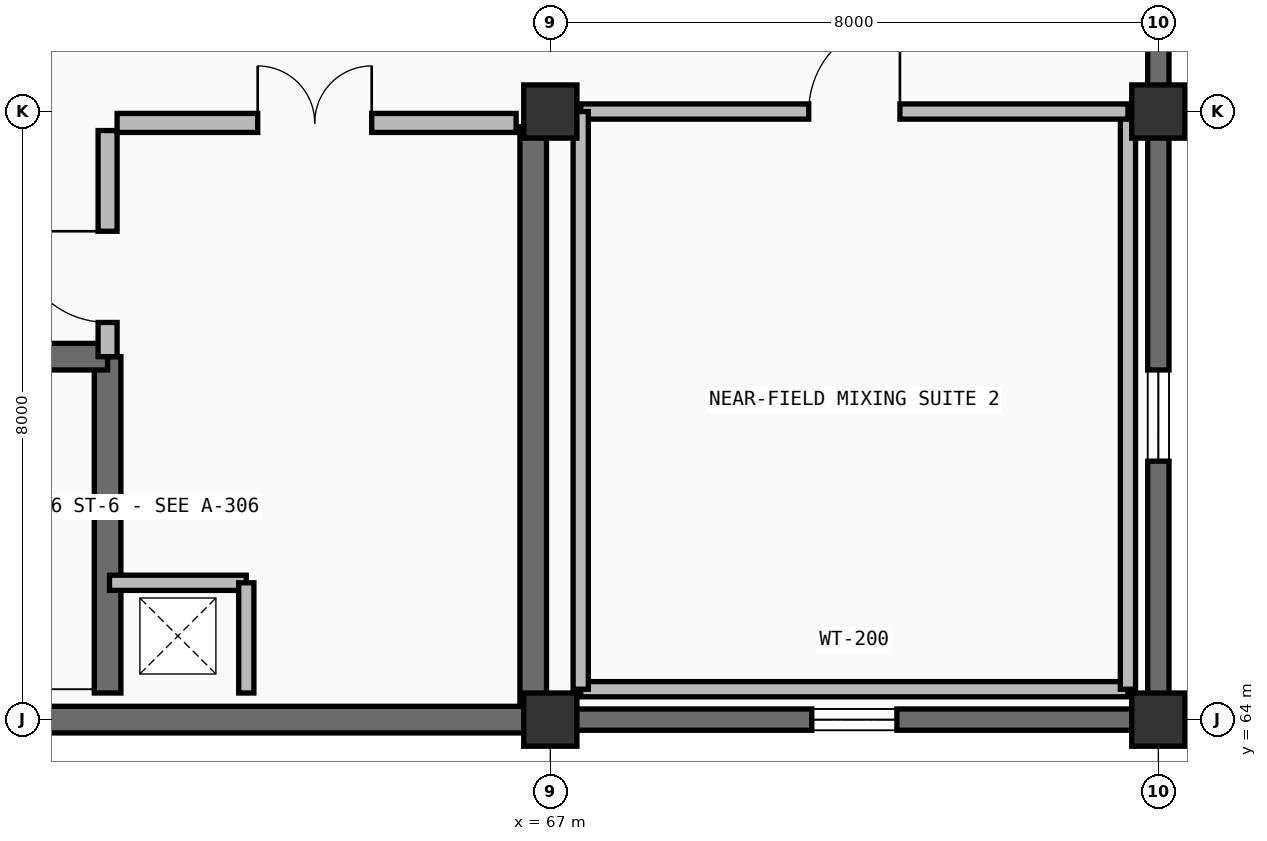
"""IFC4 building model, lengths in metres.
Left out: names, types, materials, properties, quantities, classifications, styles, units other than length and angle.
Written with IfcOpenShell. Run it as: python <this file> out.ifc"""

import sys

from ifc_helpers import new_model, si_unit, direction, frame, frame_2d, origin, origin_2d, place, context, subcontext, project, spatial, rectangle, extrude, element, fill, save


model = new_model("IFC4")
c1 = context("Model", 3, precision=1e-05, world=origin(), true_north=direction((0.0, 1.0)))
c2 = subcontext(c1, "Body", "Model", "MODEL_VIEW")
j1 = project(units=[si_unit("LENGTHUNIT", "METRE"), si_unit("PLANEANGLEUNIT", "RADIAN")], contexts=[c1])
p1 = place(None, origin())
s1 = spatial("IfcSite", under=j1, at=p1, CompositionType="ELEMENT")
p2 = place(p1, origin())
s2 = spatial("IfcBuilding", under=s1, at=p2, CompositionType="ELEMENT")
p3 = place(p2, frame((0.0, 0.0, 9.9)))
s3 = spatial("IfcBuildingStorey", under=s2, at=p3, CompositionType="ELEMENT", Elevation=9.9)
for number, where, z_axis, x_axis in (
    (1, (67.0, 64.0, 0.0), (0.0, 0.0, 1.0), (1.0, 0.0, 0.0)),
    (2, (67.0, 72.0, 0.0), (0.0, 0.0, 1.0), (1.0, 0.0, 0.0)),
    (3, (75.0, 64.0, 0.0), (0.0, 0.0, 1.0), (1.0, 0.0, 0.0)),
    (4, (75.0, 72.0, 0.0), (0.0, 0.0, 1.0), (1.0, 0.0, 0.0)),
):
    element("IfcColumn", number, at=place(p3, frame(where, z_axis=z_axis, x_axis=x_axis)), inside=s3, PredefinedType="COLUMN", context=c2, shape_type="SweptSolid", body=[
        extrude(rectangle(XDim=0.7, YDim=0.7, at=origin_2d()), origin(), (0.0, 0.0, 1.0), 4.5),
    ])
p4 = place(p3, frame((75.0, 80.0, 0.0), z_axis=(0.0, 0.0, 1.0), x_axis=(0.0, -1.0, 0.0)))
e5 = element("IfcWall", 5, at=p4, inside=s3, PredefinedType="SOLIDWALL", context=c2, shape_type="SweptSolid", body=[
    extrude(rectangle(XDim=8.0, YDim=0.28, at=frame_2d((4.0, 0.0))), origin(), (0.0, 0.0, 1.0), 4.5),
])
p5 = place(p4, frame((3.35, 0.0, 0.85)))
e6 = element("IfcOpeningElement", 6, at=p5, cuts=e5, PredefinedType="OPENING", context=c2, shape_type="SweptSolid", body=[
    extrude(rectangle(XDim=1.3, YDim=2.4, at=frame_2d((0.65, 1.2))), frame((0.0, 0.15, 0.0), z_axis=(0.0, -1.0, 0.0), x_axis=(1.0, 0.0, 0.0)), (0.0, 0.0, 1.0), 0.3),
])
p6 = place(p3, frame((75.0, 72.0, 0.0), z_axis=(0.0, 0.0, 1.0), x_axis=(0.0, -1.0, 0.0)))
e7 = element("IfcWall", 7, at=p6, inside=s3, PredefinedType="SOLIDWALL", context=c2, shape_type="SweptSolid", body=[
    extrude(rectangle(XDim=8.0, YDim=0.28, at=frame_2d((4.0, 0.0))), origin(), (0.0, 0.0, 1.0), 4.5),
])
p7 = place(p6, frame((3.4, 0.0, 0.85)))
e8 = element("IfcOpeningElement", 8, at=p7, cuts=e7, PredefinedType="OPENING", context=c2, shape_type="SweptSolid", body=[
    extrude(rectangle(XDim=1.2, YDim=2.2, at=frame_2d((0.6, 1.1))), frame((0.0, 0.15, 0.0), z_axis=(0.0, -1.0, 0.0), x_axis=(1.0, 0.0, 0.0)), (0.0, 0.0, 1.0), 0.3),
])
p8 = place(p3, frame((75.0, 64.0, 0.0), z_axis=(0.0, 0.0, 1.0), x_axis=(-1.0, 0.0, 0.0)))
e9 = element("IfcWall", 9, at=p8, inside=s3, PredefinedType="SOLIDWALL", context=c2, shape_type="SweptSolid", body=[
    extrude(rectangle(XDim=8.0, YDim=0.28, at=frame_2d((4.0, 0.0))), origin(), (0.0, 0.0, 1.0), 4.5),
])
p9 = place(p8, frame((3.44, 0.0, 0.85)))
e10 = element("IfcOpeningElement", 10, at=p9, cuts=e9, PredefinedType="OPENING", context=c2, shape_type="SweptSolid", body=[
    extrude(rectangle(XDim=1.12, YDim=2.05, at=frame_2d((0.56, 1.025))), frame((0.0, 0.15, 0.0), z_axis=(0.0, -1.0, 0.0), x_axis=(1.0, 0.0, 0.0)), (0.0, 0.0, 1.0), 0.3),
])
p10 = place(p3, frame((67.0, 64.0, 0.0), z_axis=(0.0, 0.0, 1.0), x_axis=(-1.0, 0.0, 0.0)))
e11 = element("IfcWall", 11, at=p10, inside=s3, PredefinedType="SHEAR", context=c2, shape_type="SweptSolid", body=[
    extrude(rectangle(XDim=8.0, YDim=0.35, at=frame_2d((4.0, 0.0))), origin(), (0.0, 0.0, 1.0), 4.5),
])
p11 = place(p3, frame((61.175, 64.35, 0.0), z_axis=(0.0, 0.0, 1.0), x_axis=(0.0, 1.0, 0.0)))
e12 = element("IfcWall", 12, at=p11, inside=s3, PredefinedType="SHEAR", context=c2, shape_type="SweptSolid", body=[
    extrude(rectangle(XDim=4.425, YDim=0.35, at=frame_2d((2.212, 0.0))), origin(), (0.0, 0.0, 1.0), 4.2),
])
p12 = place(p3, frame((66.775, 64.2, 0.0), z_axis=(0.0, 0.0, 1.0), x_axis=(0.0, 1.0, 0.0)))
e13 = element("IfcWall", 13, at=p12, inside=s3, PredefinedType="SHEAR", context=c2, shape_type="SweptSolid", body=[
    extrude(rectangle(XDim=7.6, YDim=0.35, at=frame_2d((3.8, 0.0))), origin(), (0.0, 0.0, 1.0), 4.2),
])
p13 = place(p3, frame((61.2, 65.8, 0.0), z_axis=(0.0, 0.0, 1.0), x_axis=(1.0, 0.0, 0.0)))
e14 = element("IfcWall", 14, at=p13, inside=s3, PredefinedType="PARTITIONING", context=c2, shape_type="SweptSolid", body=[
    extrude(rectangle(XDim=1.8, YDim=0.2, at=frame_2d((0.9, 0.0))), origin(), (0.0, 0.0, 1.0), 4.2),
])
p14 = place(p3, frame((63.0, 64.35, 0.0), z_axis=(0.0, 0.0, 1.0), x_axis=(0.0, 1.0, 0.0)))
e15 = element("IfcWall", 15, at=p14, inside=s3, PredefinedType="PARTITIONING", context=c2, shape_type="SweptSolid", body=[
    extrude(rectangle(XDim=1.45, YDim=0.2, at=frame_2d((0.725, 0.0))), origin(), (0.0, 0.0, 1.0), 4.2),
])
p15 = place(p3, frame((51.35, 68.775, 0.0), z_axis=(0.0, 0.0, 1.0), x_axis=(1.0, 0.0, 0.0)))
e16 = element("IfcWall", 16, at=p15, inside=s3, PredefinedType="SHEAR", context=c2, shape_type="SweptSolid", body=[
    extrude(rectangle(XDim=9.825, YDim=0.35, at=frame_2d((4.913, 0.0))), origin(), (0.0, 0.0, 1.0), 4.2),
])
p16 = place(p15, frame((0.4, 0.0, 0.0)))
e17 = element("IfcOpeningElement", 17, at=p16, cuts=e16, PredefinedType="OPENING", context=c2, shape_type="SweptSolid", body=[
    extrude(rectangle(XDim=1.85, YDim=2.25, at=frame_2d((0.925, 1.125))), frame((0.0, 0.185, 0.0), z_axis=(0.0, -1.0, 0.0), x_axis=(1.0, 0.0, 0.0)), (0.0, 0.0, 1.0), 0.37),
])
p17 = place(p3, frame((61.175, 68.775, 0.0), z_axis=(0.0, 0.0, 1.0), x_axis=(0.0, 1.0, 0.0)))
e18 = element("IfcWall", 18, at=p17, inside=s3, PredefinedType="PARTITIONING", context=c2, shape_type="SweptSolid", body=[
    extrude(rectangle(XDim=2.975, YDim=0.25, at=frame_2d((1.488, 0.0))), origin(), (0.0, 0.0, 1.0), 4.2),
])
p18 = place(p17, frame((0.45, 0.0, 0.0)))
e19 = element("IfcOpeningElement", 19, at=p18, cuts=e18, PredefinedType="OPENING", context=c2, shape_type="SweptSolid", body=[
    extrude(rectangle(XDim=1.2, YDim=2.2, at=frame_2d((0.6, 1.1))), frame((0.0, 0.135, 0.0), z_axis=(0.0, -1.0, 0.0), x_axis=(1.0, 0.0, 0.0)), (0.0, 0.0, 1.0), 0.27),
])
p19 = place(p3, frame((61.3, 71.85, 0.0), z_axis=(0.0, 0.0, 1.0), x_axis=(1.0, 0.0, 0.0)))
e20 = element("IfcWall", 20, at=p19, inside=s3, PredefinedType="PARTITIONING", context=c2, shape_type="SweptSolid", body=[
    extrude(rectangle(XDim=5.25, YDim=0.25, at=frame_2d((2.625, 0.0))), origin(), (0.0, 0.0, 1.0), 3.535),
])
p20 = place(p19, frame((1.85, 0.0, 0.0)))
e21 = element("IfcOpeningElement", 21, at=p20, cuts=e20, PredefinedType="OPENING", context=c2, shape_type="SweptSolid", body=[
    extrude(rectangle(XDim=1.5, YDim=2.2, at=frame_2d((0.75, 1.1))), frame((0.0, 0.135, 0.0), z_axis=(0.0, -1.0, 0.0), x_axis=(1.0, 0.0, 0.0)), (0.0, 0.0, 1.0), 0.27),
])
p21 = place(p3, frame((67.4, 64.4, 0.0), z_axis=(0.0, 0.0, 1.0), x_axis=(1.0, 0.0, 0.0)))
e22 = element("IfcWall", 22, at=p21, inside=s3, PredefinedType="PARTITIONING", context=c2, shape_type="SweptSolid", body=[
    extrude(rectangle(XDim=7.2, YDim=0.2, at=frame_2d((3.6, 0.0))), origin(), (0.0, 0.0, 1.0), 3.505),
])
p22 = place(p3, frame((74.6, 64.4, 0.0), z_axis=(0.0, 0.0, 1.0), x_axis=(0.0, 1.0, 0.0)))
e23 = element("IfcWall", 23, at=p22, inside=s3, PredefinedType="PARTITIONING", context=c2, shape_type="SweptSolid", body=[
    extrude(rectangle(XDim=7.6, YDim=0.2, at=frame_2d((3.8, 0.0))), origin(), (0.0, 0.0, 1.0), 3.505),
])
p23 = place(p3, frame((67.4, 72.0, 0.0), z_axis=(0.0, 0.0, 1.0), x_axis=(1.0, 0.0, 0.0)))
e24 = element("IfcWall", 24, at=p23, inside=s3, PredefinedType="PARTITIONING", context=c2, shape_type="SweptSolid", body=[
    extrude(rectangle(XDim=7.2, YDim=0.2, at=frame_2d((3.6, 0.0))), origin(), (0.0, 0.0, 1.0), 3.535),
])
p24 = place(p23, frame((3.0, 0.0, 0.0)))
e25 = element("IfcOpeningElement", 25, at=p24, cuts=e24, PredefinedType="OPENING", context=c2, shape_type="SweptSolid", body=[
    extrude(rectangle(XDim=1.2, YDim=2.2, at=frame_2d((0.6, 1.1))), frame((0.0, 0.11, 0.0), z_axis=(0.0, -1.0, 0.0), x_axis=(1.0, 0.0, 0.0)), (0.0, 0.0, 1.0), 0.22),
])
p25 = place(p3, frame((67.4, 64.4, 0.0), z_axis=(0.0, 0.0, 1.0), x_axis=(0.0, 1.0, 0.0)))
e26 = element("IfcWall", 26, at=p25, inside=s3, PredefinedType="PARTITIONING", context=c2, shape_type="SweptSolid", body=[
    extrude(rectangle(XDim=7.6, YDim=0.2, at=frame_2d((3.8, 0.0))), origin(), (0.0, 0.0, 1.0), 3.585),
])
p26 = place(p7, origin())
e27 = element("IfcWindow", 27, at=p26, inside=s3, PartitioningType="SINGLE_PANEL", PredefinedType="WINDOW", context=c2, shape_type="SweptSolid", body=[
    extrude(rectangle(XDim=1.2, YDim=2.2, at=frame_2d((0.6, 1.1))), frame((0.0, 0.03, 0.0), z_axis=(0.0, -1.0, 0.0), x_axis=(1.0, 0.0, 0.0)), (0.0, 0.0, 1.0), 0.06),
])
fill(e8, e27)
p27 = place(p9, origin())
e28 = element("IfcWindow", 28, at=p27, inside=s3, PartitioningType="SINGLE_PANEL", PredefinedType="WINDOW", context=c2, shape_type="SweptSolid", body=[
    extrude(rectangle(XDim=1.12, YDim=2.05, at=frame_2d((0.56, 1.025))), frame((0.0, 0.03, 0.0), z_axis=(0.0, -1.0, 0.0), x_axis=(1.0, 0.0, 0.0)), (0.0, 0.0, 1.0), 0.06),
])
fill(e10, e28)
p28 = place(p18, origin())
e29 = element("IfcDoor", 29, at=p28, inside=s3, OperationType="SINGLE_SWING_RIGHT", PredefinedType="DOOR", context=c2, shape_type="SweptSolid", body=[
    extrude(rectangle(XDim=1.2, YDim=2.2, at=frame_2d((0.6, 1.1))), frame((0.0, 0.025, 0.0), z_axis=(0.0, -1.0, 0.0), x_axis=(1.0, 0.0, 0.0)), (0.0, 0.0, 1.0), 0.05),
])
fill(e19, e29)
p29 = place(p20, origin())
e30 = element("IfcDoor", 30, at=p29, inside=s3, OperationType="DOUBLE_DOOR_SINGLE_SWING", PredefinedType="DOOR", context=c2, shape_type="SweptSolid", body=[
    extrude(rectangle(XDim=1.5, YDim=2.2, at=frame_2d((0.75, 1.1))), frame((0.0, 0.025, 0.0), z_axis=(0.0, -1.0, 0.0), x_axis=(1.0, 0.0, 0.0)), (0.0, 0.0, 1.0), 0.05),
])
fill(e21, e30)
p30 = place(p24, origin())
e31 = element("IfcDoor", 31, at=p30, inside=s3, OperationType="SINGLE_SWING_RIGHT", PredefinedType="DOOR", context=c2, shape_type="SweptSolid", body=[
    extrude(rectangle(XDim=1.2, YDim=2.2, at=frame_2d((0.6, 1.1))), frame((0.0, 0.025, 0.0), z_axis=(0.0, -1.0, 0.0), x_axis=(1.0, 0.0, 0.0)), (0.0, 0.0, 1.0), 0.05),
])
fill(e25, e31)
save(model, sys.argv[1])
